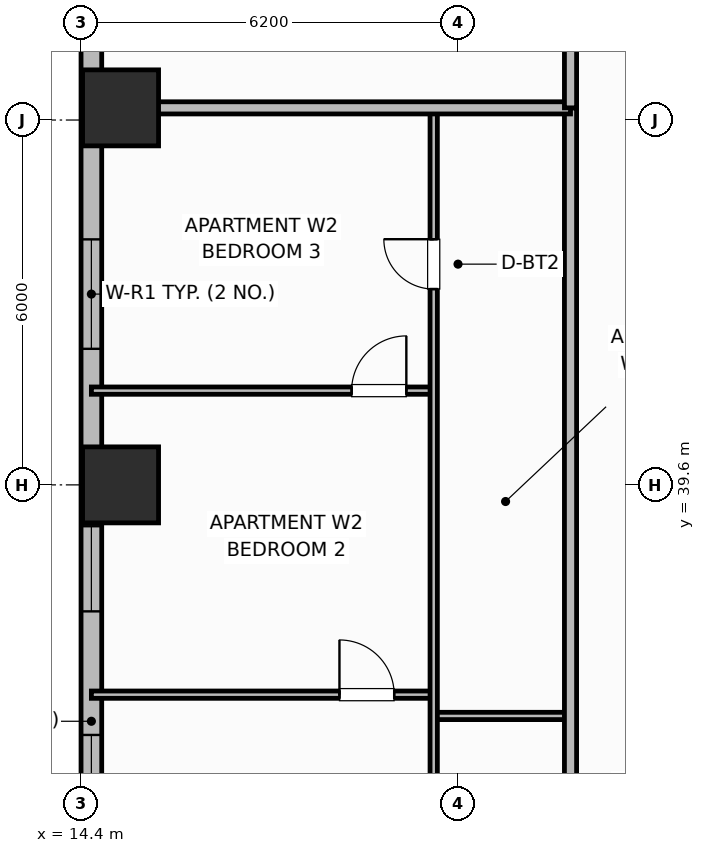
"""IFC4 building model, lengths in metres.
Left out: names, types, materials, properties, quantities, classifications, styles, units other than length and angle.
Written with IfcOpenShell. Run it as: python <this file> out.ifc"""

import sys

from ifc_helpers import new_model, si_unit, direction, frame, frame_2d, origin, origin_2d, place, context, subcontext, project, spatial, rectangle, extrude, element, fill, save


model = new_model("IFC4")
c1 = context("Model", 3, precision=1e-05, world=origin(), true_north=direction((0.0, 1.0)))
c2 = subcontext(c1, "Body", "Model", "MODEL_VIEW")
j1 = project(units=[si_unit("LENGTHUNIT", "METRE"), si_unit("PLANEANGLEUNIT", "RADIAN")], contexts=[c1])
p1 = place(None, origin())
s1 = spatial("IfcSite", under=j1, at=p1, CompositionType="ELEMENT")
p2 = place(p1, origin())
s2 = spatial("IfcBuilding", under=s1, at=p2, CompositionType="ELEMENT")
p3 = place(p2, frame((0.0, 0.0, 28.8)))
s3 = spatial("IfcBuildingStorey", under=s2, at=p3, CompositionType="ELEMENT", Elevation=28.8)
for number, where, z_axis, x_axis in (
    (1, (15.05, 39.6, 0.0), (0.0, 0.0, 1.0), (1.0, 0.0, 0.0)),
    (2, (15.05, 45.8, 0.0), (0.0, 0.0, 1.0), (1.0, 0.0, 0.0)),
):
    element("IfcColumn", number, at=place(p3, frame(where, z_axis=z_axis, x_axis=x_axis)), inside=s3, PredefinedType="COLUMN", context=c2, shape_type="SweptSolid", body=[
        extrude(rectangle(XDim=1.25, YDim=1.25, at=origin_2d()), origin(), (0.0, 0.0, 1.0), 3.7),
    ])
p4 = place(p3, frame((14.57, 47.4, 0.0), z_axis=(0.0, 0.0, 1.0), x_axis=(0.0, -1.0, 0.0)))
e3 = element("IfcWall", 3, at=p4, inside=s3, PredefinedType="SOLIDWALL", context=c2, shape_type="SweptSolid", body=[
    extrude(rectangle(XDim=14.8, YDim=0.34, at=frame_2d((7.4, 0.0))), origin(), (0.0, 0.0, 1.0), 2.7),
])
p5 = place(p4, frame((3.762, 0.0, 0.73)))
e4 = element("IfcOpeningElement", 4, at=p5, cuts=e3, PredefinedType="OPENING", context=c2, shape_type="SweptSolid", body=[
    extrude(rectangle(XDim=1.8, YDim=1.85, at=frame_2d((0.9, 0.925))), frame((0.0, 0.18, 0.0), z_axis=(0.0, -1.0, 0.0), x_axis=(1.0, 0.0, 0.0)), (0.0, 0.0, 1.0), 0.36),
])
p6 = place(p4, frame((8.48, 0.0, 0.69)))
e5 = element("IfcOpeningElement", 5, at=p6, cuts=e3, PredefinedType="OPENING", context=c2, shape_type="SweptSolid", body=[
    extrude(rectangle(XDim=1.4, YDim=1.85, at=frame_2d((0.7, 0.925))), frame((0.0, 0.18, 0.0), z_axis=(0.0, -1.0, 0.0), x_axis=(1.0, 0.0, 0.0)), (0.0, 0.0, 1.0), 0.36),
])
p7 = place(p4, frame((11.913, 0.0, 0.73)))
e6 = element("IfcOpeningElement", 6, at=p7, cuts=e3, PredefinedType="OPENING", context=c2, shape_type="SweptSolid", body=[
    extrude(rectangle(XDim=1.8, YDim=1.85, at=frame_2d((0.9, 0.925))), frame((0.0, 0.18, 0.0), z_axis=(0.0, -1.0, 0.0), x_axis=(1.0, 0.0, 0.0)), (0.0, 0.0, 1.0), 0.36),
])
p8 = place(p3, frame((20.2, 35.8, 0.0), z_axis=(0.0, 0.0, 1.0), x_axis=(1.0, 0.0, 0.0)))
e7 = element("IfcWall", 7, at=p8, inside=s3, PredefinedType="PARTITIONING", context=c2, shape_type="SweptSolid", body=[
    extrude(rectangle(XDim=2.25, YDim=0.12, at=frame_2d((1.125, 0.0))), origin(), (0.0, 0.0, 1.0), 2.53),
])
p9 = place(p3, frame((14.57, 36.15, 0.0), z_axis=(0.0, 0.0, 1.0), x_axis=(1.0, 0.0, 0.0)))
e8 = element("IfcWall", 8, at=p9, inside=s3, PredefinedType="PARTITIONING", context=c2, shape_type="SweptSolid", body=[
    extrude(rectangle(XDim=5.63, YDim=0.12, at=frame_2d((2.815, 0.0))), origin(), (0.0, 0.0, 1.0), 2.53),
])
p10 = place(p9, frame((4.08, 0.0, 0.0)))
e9 = element("IfcOpeningElement", 9, at=p10, cuts=e8, PredefinedType="OPENING", context=c2, shape_type="SweptSolid", body=[
    extrude(rectangle(XDim=0.9, YDim=2.1, at=frame_2d((0.45, 1.05))), frame((0.0, 0.07, 0.0), z_axis=(0.0, -1.0, 0.0), x_axis=(1.0, 0.0, 0.0)), (0.0, 0.0, 1.0), 0.14),
])
p11 = place(p3, frame((14.57, 41.15, 0.0), z_axis=(0.0, 0.0, 1.0), x_axis=(1.0, 0.0, 0.0)))
e10 = element("IfcWall", 10, at=p11, inside=s3, PredefinedType="PARTITIONING", context=c2, shape_type="SweptSolid", body=[
    extrude(rectangle(XDim=5.63, YDim=0.12, at=frame_2d((2.815, 0.0))), origin(), (0.0, 0.0, 1.0), 2.53),
])
p12 = place(p11, frame((4.28, 0.0, 0.0)))
e11 = element("IfcOpeningElement", 11, at=p12, cuts=e10, PredefinedType="OPENING", context=c2, shape_type="SweptSolid", body=[
    extrude(rectangle(XDim=0.9, YDim=2.1, at=frame_2d((0.45, 1.05))), frame((0.0, 0.07, 0.0), z_axis=(0.0, -1.0, 0.0), x_axis=(1.0, 0.0, 0.0)), (0.0, 0.0, 1.0), 0.14),
])
p13 = place(p3, frame((20.2, 26.64, 0.0), z_axis=(0.0, 0.0, 1.0), x_axis=(0.0, 1.0, 0.0)))
e12 = element("IfcWall", 12, at=p13, inside=s3, PredefinedType="PARTITIONING", context=c2, shape_type="SweptSolid", body=[
    extrude(rectangle(XDim=19.12, YDim=0.12, at=frame_2d((9.56, 0.0))), origin(), (0.0, 0.0, 1.0), 2.53),
])
p14 = place(p13, frame((2.81, 0.0, 0.0)))
e13 = element("IfcOpeningElement", 13, at=p14, cuts=e12, PredefinedType="OPENING", context=c2, shape_type="SweptSolid", body=[
    extrude(rectangle(XDim=0.9, YDim=2.1, at=frame_2d((0.45, 1.05))), frame((0.0, 0.07, 0.0), z_axis=(0.0, -1.0, 0.0), x_axis=(1.0, 0.0, 0.0)), (0.0, 0.0, 1.0), 0.14),
])
p15 = place(p13, frame((16.18, 0.0, 0.0)))
e14 = element("IfcOpeningElement", 14, at=p15, cuts=e12, PredefinedType="OPENING", context=c2, shape_type="SweptSolid", body=[
    extrude(rectangle(XDim=0.82, YDim=2.08, at=frame_2d((0.41, 1.04))), frame((0.0, 0.07, 0.0), z_axis=(0.0, -1.0, 0.0), x_axis=(1.0, 0.0, 0.0)), (0.0, 0.0, 1.0), 0.14),
])
p16 = place(p3, frame((22.45, 10.6, 0.0), z_axis=(0.0, 0.0, 1.0), x_axis=(0.0, 1.0, 0.0)))
e15 = element("IfcWall", 15, at=p16, inside=s3, PredefinedType="PARTITIONING", context=c2, shape_type="SweptSolid", body=[
    extrude(rectangle(XDim=35.2, YDim=0.2, at=frame_2d((17.6, 0.0))), origin(), (0.0, 0.0, 1.0), 2.53),
])
p17 = place(p16, frame((2.65, 0.0, 0.0)))
e16 = element("IfcOpeningElement", 16, at=p17, cuts=e15, PredefinedType="OPENING", context=c2, shape_type="SweptSolid", body=[
    extrude(rectangle(XDim=1.0, YDim=2.15, at=frame_2d((0.5, 1.075))), frame((0.0, 0.11, 0.0), z_axis=(0.0, -1.0, 0.0), x_axis=(1.0, 0.0, 0.0)), (0.0, 0.0, 1.0), 0.22),
])
p18 = place(p16, frame((19.95, 0.0, 0.0)))
e17 = element("IfcOpeningElement", 17, at=p18, cuts=e15, PredefinedType="OPENING", context=c2, shape_type="SweptSolid", body=[
    extrude(rectangle(XDim=1.0, YDim=2.15, at=frame_2d((0.5, 1.075))), frame((0.0, 0.11, 0.0), z_axis=(0.0, -1.0, 0.0), x_axis=(1.0, 0.0, 0.0)), (0.0, 0.0, 1.0), 0.22),
])
p19 = place(p3, frame((14.99, 45.8, 0.0), z_axis=(0.0, 0.0, 1.0), x_axis=(1.0, 0.0, 0.0)))
e18 = element("IfcWall", 18, at=p19, inside=s3, PredefinedType="PARTITIONING", context=c2, shape_type="SweptSolid", body=[
    extrude(rectangle(XDim=7.46, YDim=0.2, at=frame_2d((3.73, 0.0))), origin(), (0.0, 0.0, 1.0), 2.53),
])
p20 = place(p3, frame((22.45, 45.8, 0.0), z_axis=(0.0, 0.0, 1.0), x_axis=(0.0, 1.0, 0.0)))
e19 = element("IfcWall", 19, at=p20, inside=s3, PredefinedType="PARTITIONING", context=c2, shape_type="SweptSolid", body=[
    extrude(rectangle(XDim=5.63, YDim=0.2, at=frame_2d((2.815, 0.0))), origin(), (0.0, 0.0, 1.0), 2.53),
])
p21 = place(p5, origin())
e20 = element("IfcWindow", 20, at=p21, inside=s3, PartitioningType="SINGLE_PANEL", PredefinedType="WINDOW", context=c2, shape_type="SweptSolid", body=[
    extrude(rectangle(XDim=1.8, YDim=1.85, at=frame_2d((0.9, 0.925))), frame((0.0, 0.03, 0.0), z_axis=(0.0, -1.0, 0.0), x_axis=(1.0, 0.0, 0.0)), (0.0, 0.0, 1.0), 0.06),
])
fill(e4, e20)
p22 = place(p6, origin())
e21 = element("IfcWindow", 21, at=p22, inside=s3, PartitioningType="SINGLE_PANEL", PredefinedType="WINDOW", context=c2, shape_type="SweptSolid", body=[
    extrude(rectangle(XDim=1.4, YDim=1.85, at=frame_2d((0.7, 0.925))), frame((0.0, 0.03, 0.0), z_axis=(0.0, -1.0, 0.0), x_axis=(1.0, 0.0, 0.0)), (0.0, 0.0, 1.0), 0.06),
])
fill(e5, e21)
p23 = place(p7, origin())
e22 = element("IfcWindow", 22, at=p23, inside=s3, PartitioningType="SINGLE_PANEL", PredefinedType="WINDOW", context=c2, shape_type="SweptSolid", body=[
    extrude(rectangle(XDim=1.8, YDim=1.85, at=frame_2d((0.9, 0.925))), frame((0.0, 0.03, 0.0), z_axis=(0.0, -1.0, 0.0), x_axis=(1.0, 0.0, 0.0)), (0.0, 0.0, 1.0), 0.06),
])
fill(e6, e22)
p24 = place(p10, origin())
e23 = element("IfcDoor", 23, at=p24, inside=s3, OperationType="SINGLE_SWING_LEFT", PredefinedType="DOOR", context=c2, shape_type="SweptSolid", body=[
    extrude(rectangle(XDim=0.9, YDim=2.1, at=frame_2d((0.45, 1.05))), frame((0.0, 0.025, 0.0), z_axis=(0.0, -1.0, 0.0), x_axis=(1.0, 0.0, 0.0)), (0.0, 0.0, 1.0), 0.05),
])
fill(e9, e23)
p25 = place(p12, origin())
e24 = element("IfcDoor", 24, at=p25, inside=s3, OperationType="SINGLE_SWING_RIGHT", PredefinedType="DOOR", context=c2, shape_type="SweptSolid", body=[
    extrude(rectangle(XDim=0.9, YDim=2.1, at=frame_2d((0.45, 1.05))), frame((0.0, 0.025, 0.0), z_axis=(0.0, -1.0, 0.0), x_axis=(1.0, 0.0, 0.0)), (0.0, 0.0, 1.0), 0.05),
])
fill(e11, e24)
p26 = place(p15, origin())
e25 = element("IfcDoor", 25, at=p26, inside=s3, OperationType="SINGLE_SWING_RIGHT", PredefinedType="DOOR", context=c2, shape_type="SweptSolid", body=[
    extrude(rectangle(XDim=0.82, YDim=2.08, at=frame_2d((0.41, 1.04))), frame((0.0, 0.025, 0.0), z_axis=(0.0, -1.0, 0.0), x_axis=(1.0, 0.0, 0.0)), (0.0, 0.0, 1.0), 0.05),
])
fill(e14, e25)
save(model, sys.argv[1])
